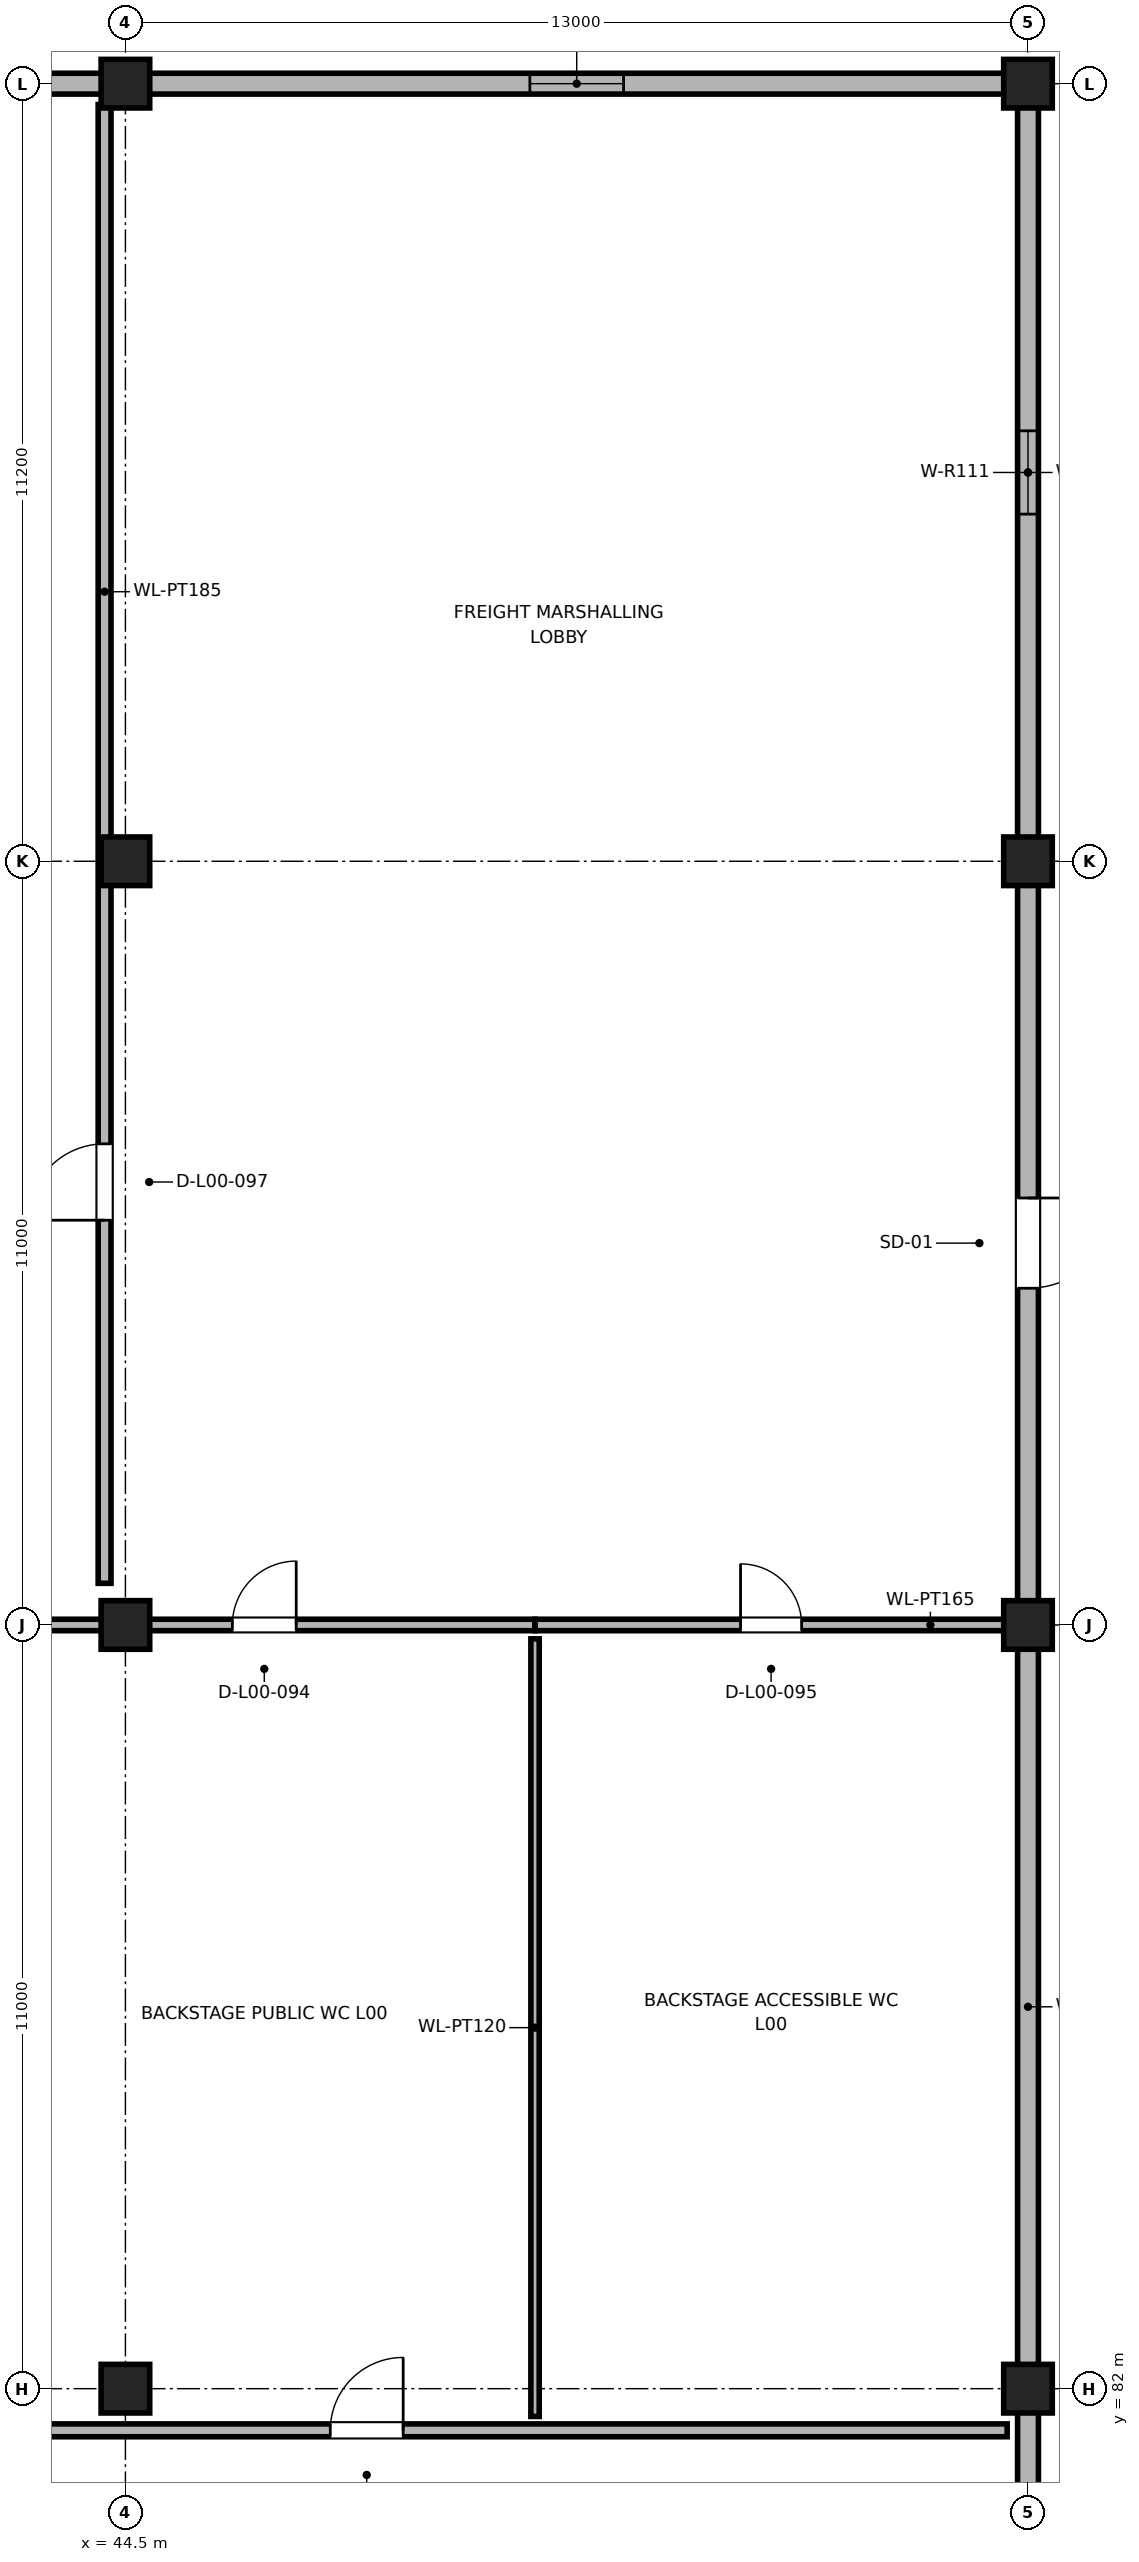
"""IFC4 building model, lengths in metres.
Left out: names, types, materials, properties, quantities, classifications, styles, units other than length and angle.
Written with IfcOpenShell. Run it as: python <this file> out.ifc"""

import sys

from ifc_helpers import new_model, si_unit, direction, frame, frame_2d, origin, origin_2d, place, context, subcontext, project, spatial, rectangle, extrude, element, fill, save


model = new_model("IFC4")
c1 = context("Model", 3, precision=1e-05, world=origin(), true_north=direction((0.0, 1.0)))
c2 = subcontext(c1, "Body", "Model", "MODEL_VIEW")
j1 = project(units=[si_unit("LENGTHUNIT", "METRE"), si_unit("PLANEANGLEUNIT", "RADIAN")], contexts=[c1])
p1 = place(None, origin())
s1 = spatial("IfcSite", under=j1, at=p1, CompositionType="ELEMENT")
p2 = place(p1, origin())
s2 = spatial("IfcBuilding", under=s1, at=p2, CompositionType="ELEMENT")
p3 = place(p2, origin())
s3 = spatial("IfcBuildingStorey", under=s2, at=p3, CompositionType="ELEMENT", Elevation=0.0)
for number, where, z_axis, x_axis in (
    (1, (44.5, 82.0, 0.0), (0.0, 0.0, 1.0), (1.0, 0.0, 0.0)),
    (2, (44.5, 93.0, 0.0), (0.0, 0.0, 1.0), (1.0, 0.0, 0.0)),
    (3, (44.5, 104.0, 0.0), (0.0, 0.0, 1.0), (1.0, 0.0, 0.0)),
    (4, (44.5, 115.2, 0.0), (0.0, 0.0, 1.0), (1.0, 0.0, 0.0)),
    (5, (57.5, 82.0, 0.0), (0.0, 0.0, 1.0), (1.0, 0.0, 0.0)),
    (6, (57.5, 93.0, 0.0), (0.0, 0.0, 1.0), (1.0, 0.0, 0.0)),
    (7, (57.5, 104.0, 0.0), (0.0, 0.0, 1.0), (1.0, 0.0, 0.0)),
    (8, (57.5, 115.2, 0.0), (0.0, 0.0, 1.0), (1.0, 0.0, 0.0)),
):
    element("IfcColumn", number, at=place(p3, frame(where, z_axis=z_axis, x_axis=x_axis)), inside=s3, PredefinedType="COLUMN", context=c2, shape_type="SweptSolid", body=[
        extrude(rectangle(XDim=0.7, YDim=0.7, at=origin_2d()), origin(), (0.0, 0.0, 1.0), 4.8),
    ])
p4 = place(p3, frame((57.5, 81.98, 0.0), z_axis=(0.0, 0.0, 1.0), x_axis=(0.0, -1.0, 0.0)))
e9 = element("IfcWall", 9, at=p4, inside=s3, PredefinedType="SOLIDWALL", context=c2, shape_type="SweptSolid", body=[
    extrude(rectangle(XDim=10.96, YDim=0.3, at=frame_2d((5.48, 0.0))), origin(), (0.0, 0.0, 1.0), 3.958),
])
p5 = place(p4, frame((4.18, 0.0, 1.5)))
e10 = element("IfcOpeningElement", 10, at=p5, cuts=e9, PredefinedType="OPENING", context=c2, shape_type="SweptSolid", body=[
    extrude(rectangle(XDim=2.6, YDim=1.05, at=frame_2d((1.3, 0.525))), frame((0.0, 0.16, 0.0), z_axis=(0.0, -1.0, 0.0), x_axis=(1.0, 0.0, 0.0)), (0.0, 0.0, 1.0), 0.32),
])
p6 = place(p3, frame((57.5, 92.98, 0.0), z_axis=(0.0, 0.0, 1.0), x_axis=(0.0, -1.0, 0.0)))
e11 = element("IfcWall", 11, at=p6, inside=s3, PredefinedType="SOLIDWALL", context=c2, shape_type="SweptSolid", body=[
    extrude(rectangle(XDim=10.96, YDim=0.3, at=frame_2d((5.48, 0.0))), origin(), (0.0, 0.0, 1.0), 3.958),
])
p7 = place(p3, frame((57.5, 103.98, 0.0), z_axis=(0.0, 0.0, 1.0), x_axis=(0.0, -1.0, 0.0)))
e12 = element("IfcWall", 12, at=p7, inside=s3, PredefinedType="SOLIDWALL", context=c2, shape_type="SweptSolid", body=[
    extrude(rectangle(XDim=10.96, YDim=0.3, at=frame_2d((5.48, 0.0))), origin(), (0.0, 0.0, 1.0), 3.958),
])
p8 = place(p7, frame((4.83, 0.0, 0.0)))
e13 = element("IfcOpeningElement", 13, at=p8, cuts=e12, PredefinedType="OPENING", context=c2, shape_type="SweptSolid", body=[
    extrude(rectangle(XDim=1.3, YDim=2.15, at=frame_2d((0.65, 1.075))), frame((0.0, 0.16, 0.0), z_axis=(0.0, -1.0, 0.0), x_axis=(1.0, 0.0, 0.0)), (0.0, 0.0, 1.0), 0.32),
])
p9 = place(p3, frame((57.5, 115.18, 0.0), z_axis=(0.0, 0.0, 1.0), x_axis=(0.0, -1.0, 0.0)))
e14 = element("IfcWall", 14, at=p9, inside=s3, PredefinedType="SOLIDWALL", context=c2, shape_type="SweptSolid", body=[
    extrude(rectangle(XDim=11.16, YDim=0.3, at=frame_2d((5.58, 0.0))), origin(), (0.0, 0.0, 1.0), 3.958),
])
p10 = place(p9, frame((4.98, 0.0, 0.9)))
e15 = element("IfcOpeningElement", 15, at=p10, cuts=e14, PredefinedType="OPENING", context=c2, shape_type="SweptSolid", body=[
    extrude(rectangle(XDim=1.2, YDim=1.55, at=frame_2d((0.6, 0.775))), frame((0.0, 0.16, 0.0), z_axis=(0.0, -1.0, 0.0), x_axis=(1.0, 0.0, 0.0)), (0.0, 0.0, 1.0), 0.32),
])
p11 = place(p3, frame((44.52, 115.2, 0.0), z_axis=(0.0, 0.0, 1.0), x_axis=(1.0, 0.0, 0.0)))
e16 = element("IfcWall", 16, at=p11, inside=s3, PredefinedType="SOLIDWALL", context=c2, shape_type="SweptSolid", body=[
    extrude(rectangle(XDim=12.96, YDim=0.3, at=frame_2d((6.48, 0.0))), origin(), (0.0, 0.0, 1.0), 3.958),
])
p12 = place(p11, frame((5.805, 0.0, 0.9)))
e17 = element("IfcOpeningElement", 17, at=p12, cuts=e16, PredefinedType="OPENING", context=c2, shape_type="SweptSolid", body=[
    extrude(rectangle(XDim=1.35, YDim=1.55, at=frame_2d((0.675, 0.775))), frame((0.0, 0.16, 0.0), z_axis=(0.0, -1.0, 0.0), x_axis=(1.0, 0.0, 0.0)), (0.0, 0.0, 1.0), 0.32),
])
p13 = place(p3, frame((31.52, 115.2, 0.0), z_axis=(0.0, 0.0, 1.0), x_axis=(1.0, 0.0, 0.0)))
e18 = element("IfcWall", 18, at=p13, inside=s3, PredefinedType="SOLIDWALL", context=c2, shape_type="SweptSolid", body=[
    extrude(rectangle(XDim=12.96, YDim=0.3, at=frame_2d((6.48, 0.0))), origin(), (0.0, 0.0, 1.0), 3.958),
])
p14 = place(p13, frame((5.73, 0.0, 0.9)))
e19 = element("IfcOpeningElement", 19, at=p14, cuts=e18, PredefinedType="OPENING", context=c2, shape_type="SweptSolid", body=[
    extrude(rectangle(XDim=1.5, YDim=1.55, at=frame_2d((0.75, 0.775))), frame((0.0, 0.16, 0.0), z_axis=(0.0, -1.0, 0.0), x_axis=(1.0, 0.0, 0.0)), (0.0, 0.0, 1.0), 0.32),
])
p15 = place(p3, frame((42.6, 93.0, 0.0), z_axis=(0.0, 0.0, 1.0), x_axis=(1.0, 0.0, 0.0)))
e20 = element("IfcWall", 20, at=p15, inside=s3, PredefinedType="PARTITIONING", context=c2, shape_type="SweptSolid", body=[
    extrude(rectangle(XDim=7.8, YDim=0.165, at=frame_2d((3.9, 0.0))), origin(), (0.0, 0.0, 1.0), 3.96),
])
p16 = place(p15, frame((3.44, 0.0, 0.0)))
e21 = element("IfcOpeningElement", 21, at=p16, cuts=e20, PredefinedType="OPENING", context=c2, shape_type="SweptSolid", body=[
    extrude(rectangle(XDim=0.92, YDim=2.1, at=frame_2d((0.46, 1.05))), frame((0.0, 0.093, 0.0), z_axis=(0.0, -1.0, 0.0), x_axis=(1.0, 0.0, 0.0)), (0.0, 0.0, 1.0), 0.185),
])
p17 = place(p3, frame((50.4, 93.0, 0.0), z_axis=(0.0, 0.0, 1.0), x_axis=(1.0, 0.0, 0.0)))
e22 = element("IfcWall", 22, at=p17, inside=s3, PredefinedType="PARTITIONING", context=c2, shape_type="SweptSolid", body=[
    extrude(rectangle(XDim=6.8, YDim=0.165, at=frame_2d((3.4, 0.0))), origin(), (0.0, 0.0, 1.0), 3.96),
])
p18 = place(p17, frame((2.96, 0.0, 0.0)))
e23 = element("IfcOpeningElement", 23, at=p18, cuts=e22, PredefinedType="OPENING", context=c2, shape_type="SweptSolid", body=[
    extrude(rectangle(XDim=0.88, YDim=2.1, at=frame_2d((0.44, 1.05))), frame((0.0, 0.093, 0.0), z_axis=(0.0, -1.0, 0.0), x_axis=(1.0, 0.0, 0.0)), (0.0, 0.0, 1.0), 0.185),
])
p19 = place(p3, frame((50.4, 81.6, 0.0), z_axis=(0.0, 0.0, 1.0), x_axis=(0.0, 1.0, 0.0)))
e24 = element("IfcWall", 24, at=p19, inside=s3, PredefinedType="PARTITIONING", context=c2, shape_type="SweptSolid", body=[
    extrude(rectangle(XDim=11.2, YDim=0.12, at=frame_2d((5.6, 0.0))), origin(), (0.0, 0.0, 1.0), 3.96),
])
p20 = place(p3, frame((42.6, 81.4, 0.0), z_axis=(0.0, 0.0, 1.0), x_axis=(1.0, 0.0, 0.0)))
e25 = element("IfcWall", 25, at=p20, inside=s3, PredefinedType="PARTITIONING", context=c2, shape_type="SweptSolid", body=[
    extrude(rectangle(XDim=14.6, YDim=0.185, at=frame_2d((7.3, 0.0))), origin(), (0.0, 0.0, 1.0), 3.96),
])
p21 = place(p20, frame((4.851, 0.0, 0.0)))
e26 = element("IfcOpeningElement", 26, at=p21, cuts=e25, PredefinedType="OPENING", context=c2, shape_type="SweptSolid", body=[
    extrude(rectangle(XDim=1.05, YDim=2.15, at=frame_2d((0.525, 1.075))), frame((0.0, 0.103, 0.0), z_axis=(0.0, -1.0, 0.0), x_axis=(1.0, 0.0, 0.0)), (0.0, 0.0, 1.0), 0.205),
])
p22 = place(p3, frame((44.2, 93.6, 0.0), z_axis=(0.0, 0.0, 1.0), x_axis=(0.0, 1.0, 0.0)))
e27 = element("IfcWall", 27, at=p22, inside=s3, PredefinedType="PARTITIONING", context=c2, shape_type="SweptSolid", body=[
    extrude(rectangle(XDim=21.3, YDim=0.185, at=frame_2d((10.65, 0.0))), origin(), (0.0, 0.0, 1.0), 3.96),
])
p23 = place(p22, frame((5.23, 0.0, 0.0)))
e28 = element("IfcOpeningElement", 28, at=p23, cuts=e27, PredefinedType="OPENING", context=c2, shape_type="SweptSolid", body=[
    extrude(rectangle(XDim=1.1, YDim=2.15, at=frame_2d((0.55, 1.075))), frame((0.0, 0.103, 0.0), z_axis=(0.0, -1.0, 0.0), x_axis=(1.0, 0.0, 0.0)), (0.0, 0.0, 1.0), 0.205),
])
p24 = place(p8, origin())
e29 = element("IfcDoor", 29, at=p24, inside=s3, OperationType="SINGLE_SWING_LEFT", PredefinedType="DOOR", context=c2, shape_type="SweptSolid", body=[
    extrude(rectangle(XDim=1.3, YDim=2.15, at=frame_2d((0.65, 1.075))), frame((0.0, 0.025, 0.0), z_axis=(0.0, -1.0, 0.0), x_axis=(1.0, 0.0, 0.0)), (0.0, 0.0, 1.0), 0.05),
])
fill(e13, e29)
p25 = place(p10, origin())
e30 = element("IfcWindow", 30, at=p25, inside=s3, PartitioningType="SINGLE_PANEL", PredefinedType="WINDOW", context=c2, shape_type="SweptSolid", body=[
    extrude(rectangle(XDim=1.2, YDim=1.55, at=frame_2d((0.6, 0.775))), frame((0.0, 0.03, 0.0), z_axis=(0.0, -1.0, 0.0), x_axis=(1.0, 0.0, 0.0)), (0.0, 0.0, 1.0), 0.06),
])
fill(e15, e30)
p26 = place(p12, origin())
e31 = element("IfcWindow", 31, at=p26, inside=s3, PartitioningType="SINGLE_PANEL", PredefinedType="WINDOW", context=c2, shape_type="SweptSolid", body=[
    extrude(rectangle(XDim=1.35, YDim=1.55, at=frame_2d((0.675, 0.775))), frame((0.0, 0.03, 0.0), z_axis=(0.0, -1.0, 0.0), x_axis=(1.0, 0.0, 0.0)), (0.0, 0.0, 1.0), 0.06),
])
fill(e17, e31)
p27 = place(p16, origin())
e32 = element("IfcDoor", 32, at=p27, inside=s3, OperationType="SINGLE_SWING_RIGHT", PredefinedType="DOOR", context=c2, shape_type="SweptSolid", body=[
    extrude(rectangle(XDim=0.92, YDim=2.1, at=frame_2d((0.46, 1.05))), frame((0.0, 0.025, 0.0), z_axis=(0.0, -1.0, 0.0), x_axis=(1.0, 0.0, 0.0)), (0.0, 0.0, 1.0), 0.05),
])
fill(e21, e32)
p28 = place(p18, origin())
e33 = element("IfcDoor", 33, at=p28, inside=s3, OperationType="SINGLE_SWING_LEFT", PredefinedType="DOOR", context=c2, shape_type="SweptSolid", body=[
    extrude(rectangle(XDim=0.88, YDim=2.1, at=frame_2d((0.44, 1.05))), frame((0.0, 0.025, 0.0), z_axis=(0.0, -1.0, 0.0), x_axis=(1.0, 0.0, 0.0)), (0.0, 0.0, 1.0), 0.05),
])
fill(e23, e33)
p29 = place(p21, origin())
e34 = element("IfcDoor", 34, at=p29, inside=s3, OperationType="SINGLE_SWING_RIGHT", PredefinedType="DOOR", context=c2, shape_type="SweptSolid", body=[
    extrude(rectangle(XDim=1.05, YDim=2.15, at=frame_2d((0.525, 1.075))), frame((0.0, 0.025, 0.0), z_axis=(0.0, -1.0, 0.0), x_axis=(1.0, 0.0, 0.0)), (0.0, 0.0, 1.0), 0.05),
])
fill(e26, e34)
p30 = place(p23, origin())
e35 = element("IfcDoor", 35, at=p30, inside=s3, OperationType="SINGLE_SWING_LEFT", PredefinedType="DOOR", context=c2, shape_type="SweptSolid", body=[
    extrude(rectangle(XDim=1.1, YDim=2.15, at=frame_2d((0.55, 1.075))), frame((0.0, 0.025, 0.0), z_axis=(0.0, -1.0, 0.0), x_axis=(1.0, 0.0, 0.0)), (0.0, 0.0, 1.0), 0.05),
])
fill(e28, e35)
save(model, sys.argv[1])
